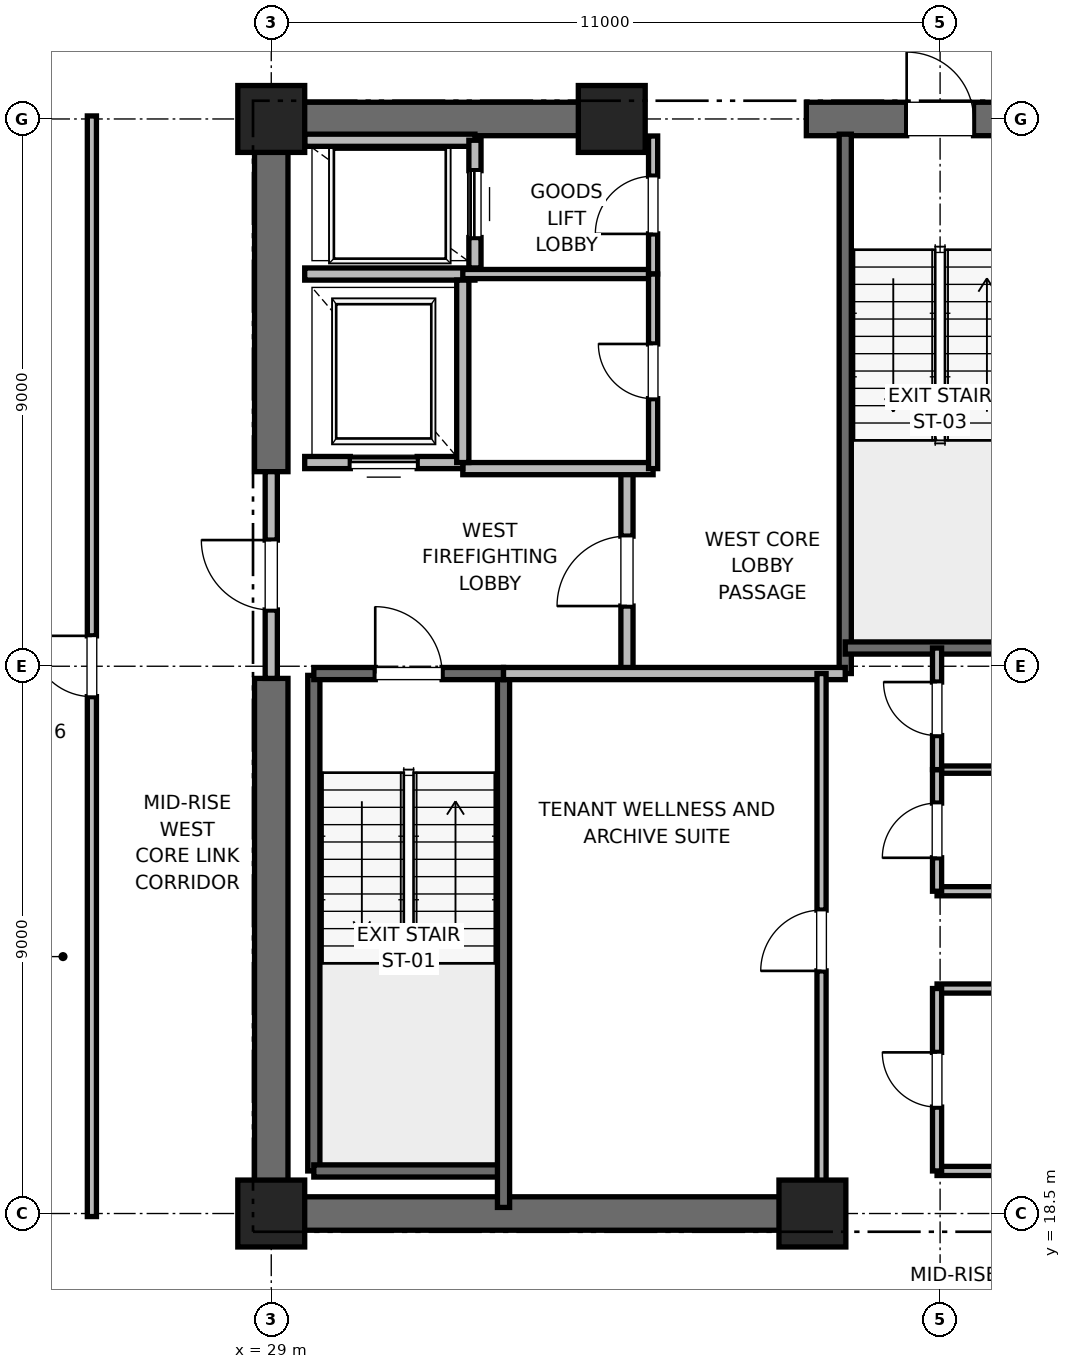
"""IFC4 building model, lengths in metres.
Left out: names, types, materials, properties, quantities, classifications, styles, units other than length and angle.
Written with IfcOpenShell. Run it as: python <this file> out.ifc"""

import sys

from ifc_helpers import new_model, si_unit, direction, frame, frame_2d, origin, origin_2d, place, context, subcontext, project, spatial, rectangle, extrude, element, fill, save


model = new_model("IFC4")
c1 = context("Model", 3, precision=1e-05, world=origin(), true_north=direction((0.0, 1.0)))
c2 = subcontext(c1, "Body", "Model", "MODEL_VIEW")
j1 = project(units=[si_unit("LENGTHUNIT", "METRE"), si_unit("PLANEANGLEUNIT", "RADIAN")], contexts=[c1])
p1 = place(None, origin())
s1 = spatial("IfcSite", under=j1, at=p1, CompositionType="ELEMENT")
p2 = place(p1, origin())
s2 = spatial("IfcBuilding", under=s1, at=p2, CompositionType="ELEMENT")
p3 = place(p2, frame((0.0, 0.0, 140.4)))
s3 = spatial("IfcBuildingStorey", under=s2, at=p3, CompositionType="ELEMENT", Elevation=140.4)
for number, where, z_axis, x_axis in (
    (1, (29.0, 18.5, 0.0), (0.0, 0.0, 1.0), (1.0, 0.0, 0.0)),
    (2, (29.0, 36.5, 0.0), (0.0, 0.0, 1.0), (1.0, 0.0, 0.0)),
    (3, (37.9, 18.5, 0.0), (0.0, 0.0, 1.0), (1.0, 0.0, 0.0)),
    (4, (34.6, 36.5, 0.0), (0.0, 0.0, 1.0), (1.0, 0.0, 0.0)),
):
    element("IfcColumn", number, at=place(p3, frame(where, z_axis=z_axis, x_axis=x_axis)), inside=s3, PredefinedType="PILASTER", context=c2, shape_type="SweptSolid", body=[
        extrude(rectangle(XDim=1.1, YDim=1.1, at=origin_2d()), origin(), (0.0, 0.0, 1.0), 4.0),
    ])
p4 = place(p3, frame((29.0, 18.5, 0.0), z_axis=(0.0, 0.0, 1.0), x_axis=(1.0, 0.0, 0.0)))
e5 = element("IfcWall", 5, at=p4, inside=s3, PredefinedType="SHEAR", context=c2, shape_type="SweptSolid", body=[
    extrude(rectangle(XDim=9.2, YDim=0.55, at=frame_2d((4.6, 0.0))), origin(), (0.0, 0.0, 1.0), 3.775),
])
p5 = place(p3, frame((29.0, 36.5, 0.0), z_axis=(0.0, 0.0, 1.0), x_axis=(1.0, 0.0, 0.0)))
e6 = element("IfcWall", 6, at=p5, inside=s3, PredefinedType="SHEAR", context=c2, shape_type="SweptSolid", body=[
    extrude(rectangle(XDim=5.8, YDim=0.55, at=frame_2d((2.9, 0.0))), origin(), (0.0, 0.0, 1.0), 3.775),
])
p6 = place(p3, frame((37.8, 36.5, 0.0), z_axis=(0.0, 0.0, 1.0), x_axis=(1.0, 0.0, 0.0)))
e7 = element("IfcWall", 7, at=p6, inside=s3, PredefinedType="SHEAR", context=c2, shape_type="SweptSolid", body=[
    extrude(rectangle(XDim=4.4, YDim=0.55, at=frame_2d((2.2, 0.0))), origin(), (0.0, 0.0, 1.0), 3.775),
])
p7 = place(p6, frame((1.65, 0.0, 0.0)))
e8 = element("IfcOpeningElement", 8, at=p7, cuts=e7, PredefinedType="OPENING", context=c2, shape_type="SweptSolid", body=[
    extrude(rectangle(XDim=1.1, YDim=2.15, at=frame_2d((0.55, 1.075))), frame((0.0, 0.275, 0.0), z_axis=(0.0, -1.0, 0.0), x_axis=(1.0, 0.0, 0.0)), (0.0, 0.0, 1.0), 0.55),
])
p8 = place(p3, frame((29.0, 18.5, 0.0), z_axis=(0.0, 0.0, 1.0), x_axis=(0.0, 1.0, 0.0)))
e9 = element("IfcWall", 9, at=p8, inside=s3, PredefinedType="SHEAR", context=c2, shape_type="SweptSolid", body=[
    extrude(rectangle(XDim=8.8, YDim=0.55, at=frame_2d((4.4, 0.0))), origin(), (0.0, 0.0, 1.0), 3.775),
])
p9 = place(p3, frame((29.0, 30.7, 0.0), z_axis=(0.0, 0.0, 1.0), x_axis=(0.0, 1.0, 0.0)))
e10 = element("IfcWall", 10, at=p9, inside=s3, PredefinedType="SHEAR", context=c2, shape_type="SweptSolid", body=[
    extrude(rectangle(XDim=5.8, YDim=0.55, at=frame_2d((2.9, 0.0))), origin(), (0.0, 0.0, 1.0), 3.775),
])
p10 = place(p3, frame((29.7, 19.2, 0.0), z_axis=(0.0, 0.0, 1.0), x_axis=(0.0, 1.0, 0.0)))
e11 = element("IfcWall", 11, at=p10, inside=s3, PredefinedType="SOLIDWALL", context=c2, shape_type="SweptSolid", body=[
    extrude(rectangle(XDim=8.15, YDim=0.2, at=frame_2d((4.075, 0.0))), origin(), (0.0, 0.0, 1.0), 3.775),
])
p11 = place(p3, frame((29.7, 19.2, 0.0), z_axis=(0.0, 0.0, 1.0), x_axis=(1.0, 0.0, 0.0)))
e12 = element("IfcWall", 12, at=p11, inside=s3, PredefinedType="SOLIDWALL", context=c2, shape_type="SweptSolid", body=[
    extrude(rectangle(XDim=3.12, YDim=0.2, at=frame_2d((1.56, 0.0))), origin(), (0.0, 0.0, 1.0), 3.775),
])
p12 = place(p3, frame((32.82, 18.6, 0.0), z_axis=(0.0, 0.0, 1.0), x_axis=(0.0, 1.0, 0.0)))
e13 = element("IfcWall", 13, at=p12, inside=s3, PredefinedType="SOLIDWALL", context=c2, shape_type="SweptSolid", body=[
    extrude(rectangle(XDim=8.78, YDim=0.2, at=frame_2d((4.39, 0.0))), origin(), (0.0, 0.0, 1.0), 3.775),
])
p13 = place(p3, frame((29.7, 27.38, 0.0), z_axis=(0.0, 0.0, 1.0), x_axis=(1.0, 0.0, 0.0)))
e14 = element("IfcWall", 14, at=p13, inside=s3, PredefinedType="SOLIDWALL", context=c2, shape_type="SweptSolid", body=[
    extrude(rectangle(XDim=3.12, YDim=0.2, at=frame_2d((1.56, 0.0))), origin(), (0.0, 0.0, 1.0), 3.775),
])
p14 = place(p13, frame((1.01, 0.0, 0.0)))
e15 = element("IfcOpeningElement", 15, at=p14, cuts=e14, PredefinedType="OPENING", context=c2, shape_type="SweptSolid", body=[
    extrude(rectangle(XDim=1.1, YDim=2.15, at=frame_2d((0.55, 1.075))), frame((0.0, 0.1, 0.0), z_axis=(0.0, -1.0, 0.0), x_axis=(1.0, 0.0, 0.0)), (0.0, 0.0, 1.0), 0.2),
])
p15 = place(p3, frame((38.44, 27.38, 0.0), z_axis=(0.0, 0.0, 1.0), x_axis=(0.0, 1.0, 0.0)))
e16 = element("IfcWall", 16, at=p15, inside=s3, PredefinedType="SOLIDWALL", context=c2, shape_type="SweptSolid", body=[
    extrude(rectangle(XDim=8.87, YDim=0.2, at=frame_2d((4.435, 0.0))), origin(), (0.0, 0.0, 1.0), 3.775),
])
p16 = place(p3, frame((38.44, 27.8, 0.0), z_axis=(0.0, 0.0, 1.0), x_axis=(1.0, 0.0, 0.0)))
e17 = element("IfcWall", 17, at=p16, inside=s3, PredefinedType="SOLIDWALL", context=c2, shape_type="SweptSolid", body=[
    extrude(rectangle(XDim=3.32, YDim=0.2, at=frame_2d((1.66, 0.0))), origin(), (0.0, 0.0, 1.0), 3.775),
])
p17 = place(p3, frame((34.85, 27.38, 0.0), z_axis=(0.0, 0.0, 1.0), x_axis=(0.0, 1.0, 0.0)))
e18 = element("IfcWall", 18, at=p17, inside=s3, PredefinedType="PARTITIONING", context=c2, shape_type="SweptSolid", body=[
    extrude(rectangle(XDim=3.37, YDim=0.2, at=frame_2d((1.685, 0.0))), origin(), (0.0, 0.0, 1.0), 3.775),
])
p18 = place(p17, frame((1.11, 0.0, 0.0)))
e19 = element("IfcOpeningElement", 19, at=p18, cuts=e18, PredefinedType="OPENING", context=c2, shape_type="SweptSolid", body=[
    extrude(rectangle(XDim=1.15, YDim=2.2, at=frame_2d((0.575, 1.1))), frame((0.0, 0.1, 0.0), z_axis=(0.0, -1.0, 0.0), x_axis=(1.0, 0.0, 0.0)), (0.0, 0.0, 1.0), 0.2),
])
p19 = place(p3, frame((29.0, 27.3, 0.0), z_axis=(0.0, 0.0, 1.0), x_axis=(0.0, 1.0, 0.0)))
e20 = element("IfcWall", 20, at=p19, inside=s3, PredefinedType="PARTITIONING", context=c2, shape_type="SweptSolid", body=[
    extrude(rectangle(XDim=3.4, YDim=0.2, at=frame_2d((1.7, 0.0))), origin(), (0.0, 0.0, 1.0), 2.755),
])
p20 = place(p19, frame((1.125, 0.0, 0.0)))
e21 = element("IfcOpeningElement", 21, at=p20, cuts=e20, PredefinedType="OPENING", context=c2, shape_type="SweptSolid", body=[
    extrude(rectangle(XDim=1.15, YDim=2.2, at=frame_2d((0.575, 1.1))), frame((0.0, 0.1, 0.0), z_axis=(0.0, -1.0, 0.0), x_axis=(1.0, 0.0, 0.0)), (0.0, 0.0, 1.0), 0.2),
])
p21 = place(p3, frame((32.82, 27.38, 0.0), z_axis=(0.0, 0.0, 1.0), x_axis=(1.0, 0.0, 0.0)))
e22 = element("IfcWall", 22, at=p21, inside=s3, PredefinedType="PARTITIONING", context=c2, shape_type="SweptSolid", body=[
    extrude(rectangle(XDim=5.62, YDim=0.2, at=frame_2d((2.81, 0.0))), origin(), (0.0, 0.0, 1.0), 3.775),
])
p22 = place(p3, frame((32.15, 30.75, 0.0), z_axis=(0.0, 0.0, 1.0), x_axis=(1.0, 0.0, 0.0)))
e23 = element("IfcWall", 23, at=p22, inside=s3, PredefinedType="PARTITIONING", context=c2, shape_type="SweptSolid", body=[
    extrude(rectangle(XDim=3.13, YDim=0.2, at=frame_2d((1.565, 0.0))), origin(), (0.0, 0.0, 1.0), 3.775),
])
p23 = place(p3, frame((29.55, 30.85, 0.0), z_axis=(0.0, 0.0, 1.0), x_axis=(1.0, 0.0, 0.0)))
e24 = element("IfcWall", 24, at=p23, inside=s3, PredefinedType="SOLIDWALL", context=c2, shape_type="SweptSolid", body=[
    extrude(rectangle(XDim=2.6, YDim=0.2, at=frame_2d((1.3, 0.0))), origin(), (0.0, 0.0, 1.0), 2.755),
])
p24 = place(p23, frame((0.75, 0.0, 0.0)))
e25 = element("IfcOpeningElement", 25, at=p24, cuts=e24, PredefinedType="OPENING", context=c2, shape_type="SweptSolid", body=[
    extrude(rectangle(XDim=1.1, YDim=2.2, at=frame_2d((0.55, 1.1))), frame((0.0, 0.1, 0.0), z_axis=(0.0, -1.0, 0.0), x_axis=(1.0, 0.0, 0.0)), (0.0, 0.0, 1.0), 0.2),
])
p25 = place(p3, frame((29.55, 33.95, 0.0), z_axis=(0.0, 0.0, 1.0), x_axis=(1.0, 0.0, 0.0)))
e26 = element("IfcWall", 26, at=p25, inside=s3, PredefinedType="SOLIDWALL", context=c2, shape_type="SweptSolid", body=[
    extrude(rectangle(XDim=2.8, YDim=0.2, at=frame_2d((1.4, 0.0))), origin(), (0.0, 0.0, 1.0), 3.775),
])
p26 = place(p3, frame((32.15, 30.85, 0.0), z_axis=(0.0, 0.0, 1.0), x_axis=(0.0, 1.0, 0.0)))
e27 = element("IfcWall", 27, at=p26, inside=s3, PredefinedType="SOLIDWALL", context=c2, shape_type="SweptSolid", body=[
    extrude(rectangle(XDim=3.0, YDim=0.2, at=frame_2d((1.5, 0.0))), origin(), (0.0, 0.0, 1.0), 3.775),
])
p27 = place(p3, frame((32.35, 36.15, 0.0), z_axis=(0.0, 0.0, 1.0), x_axis=(-1.0, 0.0, 0.0)))
e28 = element("IfcWall", 28, at=p27, inside=s3, PredefinedType="SOLIDWALL", context=c2, shape_type="SweptSolid", body=[
    extrude(rectangle(XDim=2.8, YDim=0.2, at=frame_2d((1.4, 0.0))), origin(), (0.0, 0.0, 1.0), 2.985),
])
p28 = place(p3, frame((32.35, 34.05, 0.0), z_axis=(0.0, 0.0, 1.0), x_axis=(0.0, 1.0, 0.0)))
e29 = element("IfcWall", 29, at=p28, inside=s3, PredefinedType="SOLIDWALL", context=c2, shape_type="SweptSolid", body=[
    extrude(rectangle(XDim=2.1, YDim=0.2, at=frame_2d((1.05, 0.0))), origin(), (0.0, 0.0, 1.0), 3.775),
])
p29 = place(p28, frame((0.5, 0.0, 0.0)))
e30 = element("IfcOpeningElement", 30, at=p29, cuts=e29, PredefinedType="OPENING", context=c2, shape_type="SweptSolid", body=[
    extrude(rectangle(XDim=1.1, YDim=2.2, at=frame_2d((0.55, 1.1))), frame((0.0, 0.1, 0.0), z_axis=(0.0, -1.0, 0.0), x_axis=(1.0, 0.0, 0.0)), (0.0, 0.0, 1.0), 0.2),
])
for number, where, z_axis, x_axis in (
    (31, (39.95, 19.2, 0.0), (0.0, 0.0, 1.0), (1.0, 0.0, 0.0)),
    (32, (39.95, 22.2, 0.0), (0.0, 0.0, 1.0), (1.0, 0.0, 0.0)),
    (33, (39.95, 23.8, 0.0), (0.0, 0.0, 1.0), (1.0, 0.0, 0.0)),
):
    element("IfcWall", number, at=place(p3, frame(where, z_axis=z_axis, x_axis=x_axis)), inside=s3, PredefinedType="PARTITIONING", context=c2, shape_type="SweptSolid", body=[
        extrude(rectangle(XDim=1.81, YDim=0.15, at=frame_2d((0.905, 0.0))), origin(), (0.0, 0.0, 1.0), 2.85),
    ])
p30 = place(p3, frame((39.95, 25.8, 0.0), z_axis=(0.0, 0.0, 1.0), x_axis=(1.0, 0.0, 0.0)))
e34 = element("IfcWall", 34, at=p30, inside=s3, PredefinedType="PARTITIONING", context=c2, shape_type="SweptSolid", body=[
    extrude(rectangle(XDim=1.81, YDim=0.12, at=frame_2d((0.905, 0.0))), origin(), (0.0, 0.0, 1.0), 2.85),
])
p31 = place(p3, frame((39.95, 19.2, 0.0), z_axis=(0.0, 0.0, 1.0), x_axis=(0.0, 1.0, 0.0)))
e35 = element("IfcWall", 35, at=p31, inside=s3, PredefinedType="PARTITIONING", context=c2, shape_type="SweptSolid", body=[
    extrude(rectangle(XDim=3.0, YDim=0.15, at=frame_2d((1.5, 0.0))), origin(), (0.0, 0.0, 1.0), 2.85),
])
p32 = place(p31, frame((1.05, 0.0, 0.0)))
e36 = element("IfcOpeningElement", 36, at=p32, cuts=e35, PredefinedType="OPENING", context=c2, shape_type="SweptSolid", body=[
    extrude(rectangle(XDim=0.9, YDim=2.1, at=frame_2d((0.45, 1.05))), frame((0.0, 0.075, 0.0), z_axis=(0.0, -1.0, 0.0), x_axis=(1.0, 0.0, 0.0)), (0.0, 0.0, 1.0), 0.15),
])
p33 = place(p3, frame((39.95, 23.8, 0.0), z_axis=(0.0, 0.0, 1.0), x_axis=(0.0, 1.0, 0.0)))
e37 = element("IfcWall", 37, at=p33, inside=s3, PredefinedType="PARTITIONING", context=c2, shape_type="SweptSolid", body=[
    extrude(rectangle(XDim=2.0, YDim=0.15, at=frame_2d((1.0, 0.0))), origin(), (0.0, 0.0, 1.0), 2.85),
])
p34 = place(p33, frame((0.55, 0.0, 0.0)))
e38 = element("IfcOpeningElement", 38, at=p34, cuts=e37, PredefinedType="OPENING", context=c2, shape_type="SweptSolid", body=[
    extrude(rectangle(XDim=0.9, YDim=2.1, at=frame_2d((0.45, 1.05))), frame((0.0, 0.075, 0.0), z_axis=(0.0, -1.0, 0.0), x_axis=(1.0, 0.0, 0.0)), (0.0, 0.0, 1.0), 0.15),
])
p35 = place(p3, frame((39.95, 25.8, 0.0), z_axis=(0.0, 0.0, 1.0), x_axis=(0.0, 1.0, 0.0)))
e39 = element("IfcWall", 39, at=p35, inside=s3, PredefinedType="PARTITIONING", context=c2, shape_type="SweptSolid", body=[
    extrude(rectangle(XDim=2.0, YDim=0.15, at=frame_2d((1.0, 0.0))), origin(), (0.0, 0.0, 1.0), 2.85),
])
p36 = place(p35, frame((0.56, 0.0, 0.0)))
e40 = element("IfcOpeningElement", 40, at=p36, cuts=e39, PredefinedType="OPENING", context=c2, shape_type="SweptSolid", body=[
    extrude(rectangle(XDim=0.88, YDim=2.1, at=frame_2d((0.44, 1.05))), frame((0.0, 0.075, 0.0), z_axis=(0.0, -1.0, 0.0), x_axis=(1.0, 0.0, 0.0)), (0.0, 0.0, 1.0), 0.15),
])
p37 = place(p3, frame((32.15, 33.95, 0.0), z_axis=(0.0, 0.0, 1.0), x_axis=(1.0, 0.0, 0.0)))
e41 = element("IfcWall", 41, at=p37, inside=s3, PredefinedType="PARTITIONING", context=c2, shape_type="SweptSolid", body=[
    extrude(rectangle(XDim=3.13, YDim=0.15, at=frame_2d((1.565, 0.0))), origin(), (0.0, 0.0, 1.0), 2.85),
])
p38 = place(p3, frame((35.28, 33.95, 0.0), z_axis=(0.0, 0.0, 1.0), x_axis=(0.0, 1.0, 0.0)))
e42 = element("IfcWall", 42, at=p38, inside=s3, PredefinedType="PARTITIONING", context=c2, shape_type="SweptSolid", body=[
    extrude(rectangle(XDim=2.27, YDim=0.15, at=frame_2d((1.135, 0.0))), origin(), (0.0, 0.0, 1.0), 2.755),
])
p39 = place(p38, frame((0.66, 0.0, 0.0)))
e43 = element("IfcOpeningElement", 43, at=p39, cuts=e42, PredefinedType="OPENING", context=c2, shape_type="SweptSolid", body=[
    extrude(rectangle(XDim=0.95, YDim=2.15, at=frame_2d((0.475, 1.075))), frame((0.0, 0.075, 0.0), z_axis=(0.0, -1.0, 0.0), x_axis=(1.0, 0.0, 0.0)), (0.0, 0.0, 1.0), 0.15),
])
p40 = place(p3, frame((35.28, 30.75, 0.0), z_axis=(0.0, 0.0, 1.0), x_axis=(0.0, 1.0, 0.0)))
e44 = element("IfcWall", 44, at=p40, inside=s3, PredefinedType="PARTITIONING", context=c2, shape_type="SweptSolid", body=[
    extrude(rectangle(XDim=3.2, YDim=0.15, at=frame_2d((1.6, 0.0))), origin(), (0.0, 0.0, 1.0), 2.85),
])
p41 = place(p40, frame((1.15, 0.0, 0.0)))
e45 = element("IfcOpeningElement", 45, at=p41, cuts=e44, PredefinedType="OPENING", context=c2, shape_type="SweptSolid", body=[
    extrude(rectangle(XDim=0.9, YDim=2.1, at=frame_2d((0.45, 1.05))), frame((0.0, 0.075, 0.0), z_axis=(0.0, -1.0, 0.0), x_axis=(1.0, 0.0, 0.0)), (0.0, 0.0, 1.0), 0.15),
])
p42 = place(p3, frame((38.05, 18.6, 0.0), z_axis=(0.0, 0.0, 1.0), x_axis=(0.0, 1.0, 0.0)))
e46 = element("IfcWall", 46, at=p42, inside=s3, PredefinedType="PARTITIONING", context=c2, shape_type="SweptSolid", body=[
    extrude(rectangle(XDim=8.78, YDim=0.15, at=frame_2d((4.39, 0.0))), origin(), (0.0, 0.0, 1.0), 2.755),
])
p43 = place(p42, frame((3.89, 0.0, 0.0)))
e47 = element("IfcOpeningElement", 47, at=p43, cuts=e46, PredefinedType="OPENING", context=c2, shape_type="SweptSolid", body=[
    extrude(rectangle(XDim=1.0, YDim=2.15, at=frame_2d((0.5, 1.075))), frame((0.0, 0.075, 0.0), z_axis=(0.0, -1.0, 0.0), x_axis=(1.0, 0.0, 0.0)), (0.0, 0.0, 1.0), 0.15),
])
p44 = place(p3, frame((26.05, 18.45, 0.0), z_axis=(0.0, 0.0, 1.0), x_axis=(0.0, 1.0, 0.0)))
e48 = element("IfcWall", 48, at=p44, inside=s3, PredefinedType="PARTITIONING", context=c2, shape_type="SweptSolid", body=[
    extrude(rectangle(XDim=18.1, YDim=0.15, at=frame_2d((9.05, 0.0))), origin(), (0.0, 0.0, 1.0), 2.85),
])
p45 = place(p44, frame((8.55, 0.0, 0.0)))
e49 = element("IfcOpeningElement", 49, at=p45, cuts=e48, PredefinedType="OPENING", context=c2, shape_type="SweptSolid", body=[
    extrude(rectangle(XDim=1.0, YDim=2.15, at=frame_2d((0.5, 1.075))), frame((0.0, 0.075, 0.0), z_axis=(0.0, -1.0, 0.0), x_axis=(1.0, 0.0, 0.0)), (0.0, 0.0, 1.0), 0.15),
])
p46 = place(p14, origin())
e50 = element("IfcDoor", 50, at=p46, inside=s3, OperationType="SINGLE_SWING_LEFT", PredefinedType="DOOR", context=c2, shape_type="SweptSolid", body=[
    extrude(rectangle(XDim=1.1, YDim=2.15, at=frame_2d((0.55, 1.075))), frame((0.0, 0.025, 0.0), z_axis=(0.0, -1.0, 0.0), x_axis=(1.0, 0.0, 0.0)), (0.0, 0.0, 1.0), 0.05),
])
fill(e15, e50)
p47 = place(p7, origin())
e51 = element("IfcDoor", 51, at=p47, inside=s3, OperationType="SINGLE_SWING_LEFT", PredefinedType="DOOR", context=c2, shape_type="SweptSolid", body=[
    extrude(rectangle(XDim=1.1, YDim=2.15, at=frame_2d((0.55, 1.075))), frame((0.0, 0.025, 0.0), z_axis=(0.0, -1.0, 0.0), x_axis=(1.0, 0.0, 0.0)), (0.0, 0.0, 1.0), 0.05),
])
fill(e8, e51)
p48 = place(p18, origin())
e52 = element("IfcDoor", 52, at=p48, inside=s3, OperationType="SINGLE_SWING_LEFT", PredefinedType="DOOR", context=c2, shape_type="SweptSolid", body=[
    extrude(rectangle(XDim=1.15, YDim=2.2, at=frame_2d((0.575, 1.1))), frame((0.0, 0.025, 0.0), z_axis=(0.0, -1.0, 0.0), x_axis=(1.0, 0.0, 0.0)), (0.0, 0.0, 1.0), 0.05),
])
fill(e19, e52)
p49 = place(p20, origin())
e53 = element("IfcDoor", 53, at=p49, inside=s3, OperationType="SINGLE_SWING_RIGHT", PredefinedType="DOOR", context=c2, shape_type="SweptSolid", body=[
    extrude(rectangle(XDim=1.15, YDim=2.2, at=frame_2d((0.575, 1.1))), frame((0.0, 0.025, 0.0), z_axis=(0.0, -1.0, 0.0), x_axis=(1.0, 0.0, 0.0)), (0.0, 0.0, 1.0), 0.05),
])
fill(e21, e53)
p50 = place(p24, origin())
e54 = element("IfcDoor", 54, at=p50, inside=s3, OperationType="SLIDING_TO_RIGHT", PredefinedType="DOOR", context=c2, shape_type="SweptSolid", body=[
    extrude(rectangle(XDim=1.1, YDim=2.2, at=frame_2d((0.55, 1.1))), frame((0.0, 0.025, 0.0), z_axis=(0.0, -1.0, 0.0), x_axis=(1.0, 0.0, 0.0)), (0.0, 0.0, 1.0), 0.05),
])
fill(e25, e54)
p51 = place(p29, origin())
e55 = element("IfcDoor", 55, at=p51, inside=s3, OperationType="SLIDING_TO_RIGHT", PredefinedType="DOOR", context=c2, shape_type="SweptSolid", body=[
    extrude(rectangle(XDim=1.1, YDim=2.2, at=frame_2d((0.55, 1.1))), frame((0.0, 0.025, 0.0), z_axis=(0.0, -1.0, 0.0), x_axis=(1.0, 0.0, 0.0)), (0.0, 0.0, 1.0), 0.05),
])
fill(e30, e55)
p52 = place(p32, origin())
e56 = element("IfcDoor", 56, at=p52, inside=s3, OperationType="SINGLE_SWING_RIGHT", PredefinedType="DOOR", context=c2, shape_type="SweptSolid", body=[
    extrude(rectangle(XDim=0.9, YDim=2.1, at=frame_2d((0.45, 1.05))), frame((0.0, 0.025, 0.0), z_axis=(0.0, -1.0, 0.0), x_axis=(1.0, 0.0, 0.0)), (0.0, 0.0, 1.0), 0.05),
])
fill(e36, e56)
p53 = place(p34, origin())
e57 = element("IfcDoor", 57, at=p53, inside=s3, OperationType="SINGLE_SWING_LEFT", PredefinedType="DOOR", context=c2, shape_type="SweptSolid", body=[
    extrude(rectangle(XDim=0.9, YDim=2.1, at=frame_2d((0.45, 1.05))), frame((0.0, 0.025, 0.0), z_axis=(0.0, -1.0, 0.0), x_axis=(1.0, 0.0, 0.0)), (0.0, 0.0, 1.0), 0.05),
])
fill(e38, e57)
p54 = place(p36, origin())
e58 = element("IfcDoor", 58, at=p54, inside=s3, OperationType="SINGLE_SWING_RIGHT", PredefinedType="DOOR", context=c2, shape_type="SweptSolid", body=[
    extrude(rectangle(XDim=0.88, YDim=2.1, at=frame_2d((0.44, 1.05))), frame((0.0, 0.025, 0.0), z_axis=(0.0, -1.0, 0.0), x_axis=(1.0, 0.0, 0.0)), (0.0, 0.0, 1.0), 0.05),
])
fill(e40, e58)
p55 = place(p39, origin())
e59 = element("IfcDoor", 59, at=p55, inside=s3, OperationType="SINGLE_SWING_LEFT", PredefinedType="DOOR", context=c2, shape_type="SweptSolid", body=[
    extrude(rectangle(XDim=0.95, YDim=2.15, at=frame_2d((0.475, 1.075))), frame((0.0, 0.025, 0.0), z_axis=(0.0, -1.0, 0.0), x_axis=(1.0, 0.0, 0.0)), (0.0, 0.0, 1.0), 0.05),
])
fill(e43, e59)
p56 = place(p41, origin())
e60 = element("IfcDoor", 60, at=p56, inside=s3, OperationType="SINGLE_SWING_RIGHT", PredefinedType="DOOR", context=c2, shape_type="SweptSolid", body=[
    extrude(rectangle(XDim=0.9, YDim=2.1, at=frame_2d((0.45, 1.05))), frame((0.0, 0.025, 0.0), z_axis=(0.0, -1.0, 0.0), x_axis=(1.0, 0.0, 0.0)), (0.0, 0.0, 1.0), 0.05),
])
fill(e45, e60)
p57 = place(p43, origin())
e61 = element("IfcDoor", 61, at=p57, inside=s3, OperationType="SINGLE_SWING_LEFT", PredefinedType="DOOR", context=c2, shape_type="SweptSolid", body=[
    extrude(rectangle(XDim=1.0, YDim=2.15, at=frame_2d((0.5, 1.075))), frame((0.0, 0.025, 0.0), z_axis=(0.0, -1.0, 0.0), x_axis=(1.0, 0.0, 0.0)), (0.0, 0.0, 1.0), 0.05),
])
fill(e47, e61)
p58 = place(p45, origin())
e62 = element("IfcDoor", 62, at=p58, inside=s3, OperationType="SINGLE_SWING_RIGHT", PredefinedType="DOOR", context=c2, shape_type="SweptSolid", body=[
    extrude(rectangle(XDim=1.0, YDim=2.15, at=frame_2d((0.5, 1.075))), frame((0.0, 0.025, 0.0), z_axis=(0.0, -1.0, 0.0), x_axis=(1.0, 0.0, 0.0)), (0.0, 0.0, 1.0), 0.05),
])
fill(e49, e62)
save(model, sys.argv[1])
